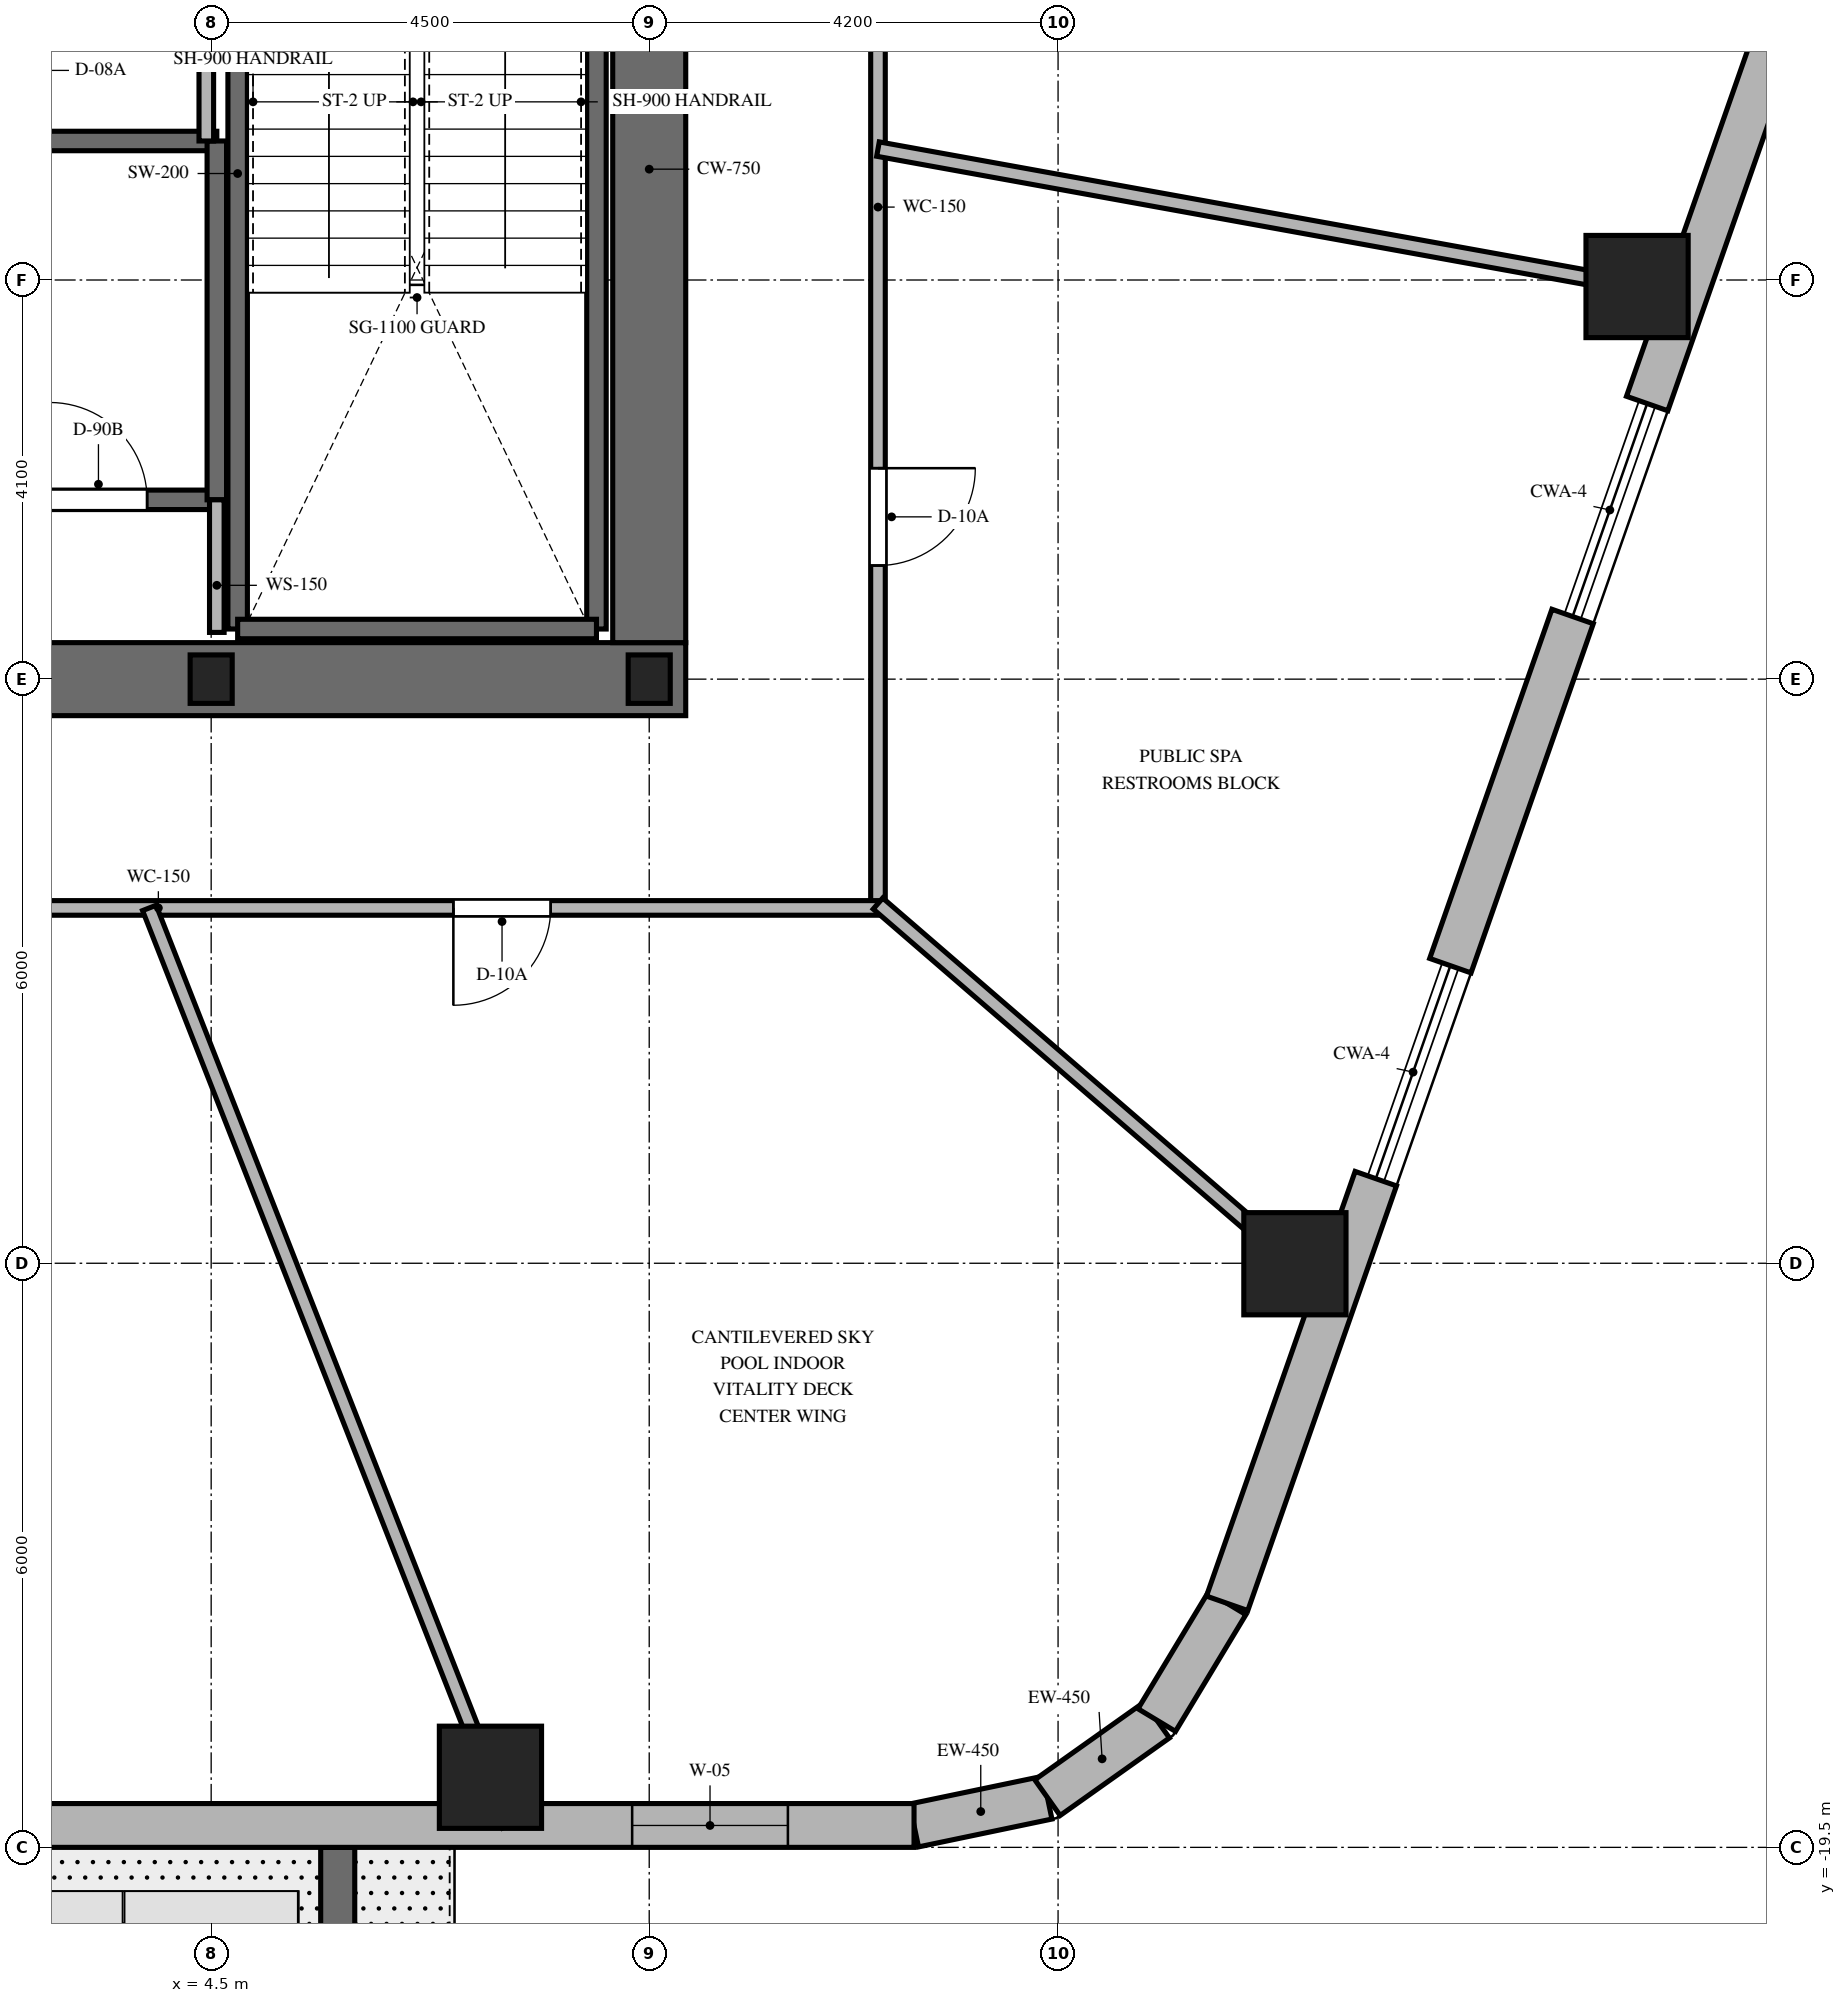
"""IFC4 building model, lengths in metres.
Left out: names, types, materials, properties, quantities, classifications, styles, units other than length and angle.
Written with IfcOpenShell. Run it as: python <this file> out.ifc"""

import sys

from ifc_helpers import new_model, si_unit, direction, frame, frame_2d, origin, origin_2d, place, context, subcontext, project, spatial, rectangle, i_section, extrude, element, fill, save


model = new_model("IFC4")
c1 = context("Model", 3, precision=1e-05, world=origin(), true_north=direction((0.0, 1.0)))
c2 = subcontext(c1, "Body", "Model", "MODEL_VIEW")
j1 = project(units=[si_unit("LENGTHUNIT", "METRE"), si_unit("PLANEANGLEUNIT", "RADIAN")], contexts=[c1])
p1 = place(None, origin())
s1 = spatial("IfcSite", under=j1, at=p1, CompositionType="ELEMENT")
p2 = place(p1, origin())
s2 = spatial("IfcBuilding", under=s1, at=p2, CompositionType="ELEMENT")
p3 = place(p2, frame((0.0, 0.0, 201.5)))
s3 = spatial("IfcBuildingStorey", under=s2, at=p3, CompositionType="ELEMENT", Elevation=201.5)
p4 = place(p3, frame((-9.375, -7.5, 0.0), z_axis=(0.0, 0.0, 1.0), x_axis=(1.0, 0.0, 0.0)))
e1 = element("IfcWall", 1, at=p4, inside=s3, PredefinedType="SHEAR", context=c2, shape_type="SweptSolid", body=[
    extrude(rectangle(XDim=18.75, YDim=0.75, at=frame_2d((9.375, 0.0))), origin(), (0.0, 0.0, 1.0), 5.0),
])
p5 = place(p4, frame((9.425, 0.0, 0.0)))
e2 = element("IfcOpeningElement", 2, at=p5, cuts=e1, PredefinedType="OPENING", context=c2, shape_type="SweptSolid", body=[
    extrude(rectangle(XDim=1.0, YDim=2.15, at=frame_2d((0.5, 1.075))), frame((0.0, 0.385, 0.0), z_axis=(0.0, -1.0, 0.0), x_axis=(1.0, 0.0, 0.0)), (0.0, 0.0, 1.0), 0.77),
])
p6 = place(p3, frame((9.0, -7.125, 0.0), z_axis=(0.0, 0.0, 1.0), x_axis=(0.0, 1.0, 0.0)))
e3 = element("IfcWall", 3, at=p6, inside=s3, PredefinedType="SHEAR", context=c2, shape_type="SweptSolid", body=[
    extrude(rectangle(XDim=14.25, YDim=0.75, at=frame_2d((7.125, 0.0))), origin(), (0.0, 0.0, 1.0), 5.0),
])
p7 = place(p6, frame((10.25, 0.0, 0.0)))
e4 = element("IfcOpeningElement", 4, at=p7, cuts=e3, PredefinedType="OPENING", context=c2, shape_type="SweptSolid", body=[
    extrude(rectangle(XDim=1.05, YDim=2.15, at=frame_2d((0.525, 1.075))), frame((0.0, 0.385, 0.0), z_axis=(0.0, -1.0, 0.0), x_axis=(1.0, 0.0, 0.0)), (0.0, 0.0, 1.0), 0.77),
])
for number, where, z_axis, x_axis in (
    (5, (4.772, -6.985, 0.0), (0.0, 0.0, 1.0), (0.0, 1.0, 0.0)),
    (6, (8.458, -6.985, 0.0), (0.0, 0.0, 1.0), (0.0, 1.0, 0.0)),
):
    element("IfcWall", number, at=place(p3, frame(where, z_axis=z_axis, x_axis=x_axis)), inside=s3, PredefinedType="SHEAR", context=c2, shape_type="SweptSolid", body=[
        extrude(rectangle(XDim=9.143, YDim=0.2, at=frame_2d((4.572, 0.0))), origin(), (0.0, 0.0, 1.0), 5.0),
    ])
p8 = place(p3, frame((4.772, -6.985, 0.0), z_axis=(0.0, 0.0, 1.0), x_axis=(1.0, 0.0, 0.0)))
e7 = element("IfcWall", 7, at=p8, inside=s3, PredefinedType="SHEAR", context=c2, shape_type="SweptSolid", body=[
    extrude(rectangle(XDim=3.686, YDim=0.2, at=frame_2d((1.843, 0.0))), origin(), (0.0, 0.0, 1.0), 5.0),
])
p9 = place(p3, frame((-4.608, -5.658, 0.0), z_axis=(0.0, 0.0, 1.0), x_axis=(1.0, 0.0, 0.0)))
e8 = element("IfcWall", 8, at=p9, inside=s3, PredefinedType="SHEAR", context=c2, shape_type="SweptSolid", body=[
    extrude(rectangle(XDim=9.166, YDim=0.2, at=frame_2d((4.583, 0.0))), origin(), (0.0, 0.0, 1.0), 5.0),
])
p10 = place(p9, frame((7.45, 0.0, 0.0)))
e9 = element("IfcOpeningElement", 9, at=p10, cuts=e8, PredefinedType="OPENING", context=c2, shape_type="SweptSolid", body=[
    extrude(rectangle(XDim=1.0, YDim=2.15, at=frame_2d((0.5, 1.075))), frame((0.0, 0.11, 0.0), z_axis=(0.0, -1.0, 0.0), x_axis=(1.0, 0.0, 0.0)), (0.0, 0.0, 1.0), 0.22),
])
p11 = place(p3, frame((-4.608, -1.972, 0.0), z_axis=(0.0, 0.0, 1.0), x_axis=(1.0, 0.0, 0.0)))
e10 = element("IfcWall", 10, at=p11, inside=s3, PredefinedType="SHEAR", context=c2, shape_type="SweptSolid", body=[
    extrude(rectangle(XDim=9.166, YDim=0.2, at=frame_2d((4.583, 0.0))), origin(), (0.0, 0.0, 1.0), 5.0),
])
p12 = place(p3, frame((4.558, -5.658, 0.0), z_axis=(0.0, 0.0, 1.0), x_axis=(0.0, 1.0, 0.0)))
e11 = element("IfcWall", 11, at=p12, inside=s3, PredefinedType="SHEAR", context=c2, shape_type="SweptSolid", body=[
    extrude(rectangle(XDim=3.686, YDim=0.2, at=frame_2d((1.843, 0.0))), origin(), (0.0, 0.0, 1.0), 5.0),
])
for number, where, z_axis, x_axis in (
    (12, (4.5, -7.5, 0.0), (0.0, 0.0, 1.0), (1.0, 0.0, 0.0)),
    (13, (9.0, -7.5, 0.0), (0.0, 0.0, 1.0), (1.0, 0.0, 0.0)),
):
    element("IfcColumn", number, at=place(p3, frame(where, z_axis=z_axis, x_axis=x_axis)), inside=s3, PredefinedType="COLUMN", context=c2, shape_type="SweptSolid", body=[
        extrude(i_section(OverallWidth=0.432, OverallDepth=0.498, WebThickness=0.056, FlangeThickness=0.089, at=origin_2d()), origin(), (0.0, 0.0, 1.0), 5.0),
    ])
for number, where, z_axis, x_axis in (
    (14, (7.369, -18.78, 0.0), (0.0, 0.0, 1.0), (1.0, 0.0, 0.0)),
    (15, (15.633, -13.505, 0.0), (0.0, 0.0, 1.0), (1.0, 0.0, 0.0)),
    (16, (19.148, -3.467, 0.0), (0.0, 0.0, 1.0), (1.0, 0.0, 0.0)),
):
    element("IfcColumn", number, at=place(p3, frame(where, z_axis=z_axis, x_axis=x_axis)), inside=s3, PredefinedType="COLUMN", context=c2, shape_type="SweptSolid", body=[
        extrude(rectangle(XDim=1.05, YDim=1.05, at=origin_2d()), origin(), (0.0, 0.0, 1.0), 5.0),
    ])
p13 = place(p3, frame((5.8, -21.93, 0.0), z_axis=(0.0, 0.0, 1.0), x_axis=(0.0, 1.0, 0.0)))
e17 = element("IfcWall", 17, at=p13, inside=s3, PredefinedType="SOLIDWALL", context=c2, shape_type="SweptSolid", body=[
    extrude(rectangle(XDim=2.43, YDim=0.35, at=frame_2d((1.215, 0.0))), origin(), (0.0, 0.0, 1.0), 1.42),
])
p14 = place(p3, frame((11.72, -19.275, 0.0), z_axis=(0.0, 0.0, 1.0), x_axis=(0.97893106758, 0.204191001093, 0.0)))
e18 = element("IfcWall", 18, at=p14, inside=s3, PredefinedType="SOLIDWALL", context=c2, shape_type="SweptSolid", body=[
    extrude(rectangle(XDim=1.4, YDim=0.45, at=frame_2d((0.7, 0.0))), origin(), (0.0, 0.0, 1.0), 4.7),
])
p15 = place(p3, frame((13.091, -18.989, 0.0), z_axis=(0.0, 0.0, 1.0), x_axis=(0.815574637848, 0.578651890258, 0.0)))
e19 = element("IfcWall", 19, at=p15, inside=s3, PredefinedType="SOLIDWALL", context=c2, shape_type="SweptSolid", body=[
    extrude(rectangle(XDim=1.377, YDim=0.45, at=frame_2d((0.688, 0.0))), origin(), (0.0, 0.0, 1.0), 4.7),
])
p16 = place(p3, frame((14.214, -18.192, 0.0), z_axis=(0.0, 0.0, 1.0), x_axis=(0.516340945502, 0.856383108193, 0.0)))
e20 = element("IfcWall", 20, at=p16, inside=s3, PredefinedType="SOLIDWALL", context=c2, shape_type="SweptSolid", body=[
    extrude(rectangle(XDim=1.4, YDim=0.45, at=frame_2d((0.7, 0.0))), origin(), (0.0, 0.0, 1.0), 4.7),
])
p17 = place(p3, frame((-10.108, -19.275, 0.0), z_axis=(0.0, 0.0, 1.0), x_axis=(1.0, 0.0, 0.0)))
e21 = element("IfcWall", 21, at=p17, inside=s3, PredefinedType="SOLIDWALL", context=c2, shape_type="SweptSolid", body=[
    extrude(rectangle(XDim=21.829, YDim=0.45, at=frame_2d((10.915, 0.0))), origin(), (0.0, 0.0, 1.0), 4.7),
])
p18 = place(p17, frame((5.503, 0.0, 0.0)))
e22 = element("IfcOpeningElement", 22, at=p18, cuts=e21, PredefinedType="OPENING", context=c2, shape_type="SweptSolid", body=[
    extrude(rectangle(XDim=1.0, YDim=2.15, at=frame_2d((0.5, 1.075))), frame((0.0, 0.235, 0.0), z_axis=(0.0, -1.0, 0.0), x_axis=(1.0, 0.0, 0.0)), (0.0, 0.0, 1.0), 0.47),
])
p19 = place(p17, frame((10.115, 0.0, 0.8)))
e23 = element("IfcOpeningElement", 23, at=p19, cuts=e21, PredefinedType="OPENING", context=c2, shape_type="SweptSolid", body=[
    extrude(rectangle(XDim=1.6, YDim=1.75, at=frame_2d((0.8, 0.875))), frame((0.0, 0.235, 0.0), z_axis=(0.0, -1.0, 0.0), x_axis=(1.0, 0.0, 0.0)), (0.0, 0.0, 1.0), 0.47),
])
p20 = place(p17, frame((18.933, 0.0, 0.8)))
e24 = element("IfcOpeningElement", 24, at=p20, cuts=e21, PredefinedType="OPENING", context=c2, shape_type="SweptSolid", body=[
    extrude(rectangle(XDim=1.6, YDim=1.75, at=frame_2d((0.8, 0.875))), frame((0.0, 0.235, 0.0), z_axis=(0.0, -1.0, 0.0), x_axis=(1.0, 0.0, 0.0)), (0.0, 0.0, 1.0), 0.47),
])
p21 = place(p3, frame((14.937, -16.993, 0.0), z_axis=(0.0, 0.0, 1.0), x_axis=(0.330437475159, 0.943827884209, 0.0)))
e25 = element("IfcWall", 25, at=p21, inside=s3, PredefinedType="SOLIDWALL", context=c2, shape_type="SweptSolid", body=[
    extrude(rectangle(XDim=4.622, YDim=0.45, at=frame_2d((2.311, 0.0))), origin(), (0.0, 0.0, 1.0), 4.7),
])
p22 = place(p3, frame((17.23, -10.443, 0.0), z_axis=(0.0, 0.0, 1.0), x_axis=(0.330436280441, 0.943828302483, 0.0)))
e26 = element("IfcWall", 26, at=p22, inside=s3, PredefinedType="SOLIDWALL", context=c2, shape_type="SweptSolid", body=[
    extrude(rectangle(XDim=3.8, YDim=0.45, at=frame_2d((1.9, 0.0))), origin(), (0.0, 0.0, 1.0), 4.7),
])
p23 = place(p3, frame((19.252, -4.669, 0.0), z_axis=(0.0, 0.0, 1.0), x_axis=(0.330411483424, 0.943836983606, 0.0)))
e27 = element("IfcWall", 27, at=p23, inside=s3, PredefinedType="SOLIDWALL", context=c2, shape_type="SweptSolid", body=[
    extrude(rectangle(XDim=4.631, YDim=0.45, at=frame_2d((2.315, 0.0))), origin(), (0.0, 0.0, 1.0), 4.7),
])
p24 = place(p3, frame((4.558, -7.02, 0.0), z_axis=(0.0, 0.0, 1.0), x_axis=(0.0, 1.0, 0.0)))
e28 = element("IfcWall", 28, at=p24, inside=s3, PredefinedType="PARTITIONING", context=c2, shape_type="SweptSolid", body=[
    extrude(rectangle(XDim=1.362, YDim=0.15, at=frame_2d((0.681, 0.0))), origin(), (0.0, 0.0, 1.0), 4.7),
])
p25 = place(p3, frame((4.45, -1.972, 0.0), z_axis=(0.0, 0.0, 1.0), x_axis=(0.0, 1.0, 0.0)))
e29 = element("IfcWall", 29, at=p25, inside=s3, PredefinedType="PARTITIONING", context=c2, shape_type="SweptSolid", body=[
    extrude(rectangle(XDim=4.222, YDim=0.15, at=frame_2d((2.111, 0.0))), origin(), (0.0, 0.0, 1.0), 4.7),
])
p26 = place(p3, frame((11.35, 9.85, 0.0), z_axis=(0.0, 0.0, 1.0), x_axis=(0.0, -1.0, 0.0)))
e30 = element("IfcWall", 30, at=p26, inside=s3, PredefinedType="PARTITIONING", context=c2, shape_type="SweptSolid", body=[
    extrude(rectangle(XDim=19.7, YDim=0.15, at=frame_2d((9.85, 0.0))), origin(), (0.0, 0.0, 1.0), 2.89),
])
p27 = place(p26, frame((2.989, 0.0, 0.0)))
e31 = element("IfcOpeningElement", 31, at=p27, cuts=e30, PredefinedType="OPENING", context=c2, shape_type="SweptSolid", body=[
    extrude(rectangle(XDim=1.0, YDim=2.03, at=frame_2d((0.5, 1.015))), frame((0.0, 0.085, 0.0), z_axis=(0.0, -1.0, 0.0), x_axis=(1.0, 0.0, 0.0)), (0.0, 0.0, 1.0), 0.17),
])
p28 = place(p26, frame((15.183, 0.0, 0.0)))
e32 = element("IfcOpeningElement", 32, at=p28, cuts=e30, PredefinedType="OPENING", context=c2, shape_type="SweptSolid", body=[
    extrude(rectangle(XDim=1.0, YDim=2.03, at=frame_2d((0.5, 1.015))), frame((0.0, 0.085, 0.0), z_axis=(0.0, -1.0, 0.0), x_axis=(1.0, 0.0, 0.0)), (0.0, 0.0, 1.0), 0.17),
])
p29 = place(p26, frame((8.819, 0.0, 0.0)))
e33 = element("IfcOpeningElement", 33, at=p29, cuts=e30, PredefinedType="OPENING", context=c2, shape_type="SweptSolid", body=[
    extrude(rectangle(XDim=1.0, YDim=2.03, at=frame_2d((0.5, 1.015))), frame((0.0, 0.085, 0.0), z_axis=(0.0, -1.0, 0.0), x_axis=(1.0, 0.0, 0.0)), (0.0, 0.0, 1.0), 0.17),
])
p30 = place(p3, frame((11.35, -9.85, 0.0), z_axis=(0.0, 0.0, 1.0), x_axis=(-1.0, 0.0, 0.0)))
e34 = element("IfcWall", 34, at=p30, inside=s3, PredefinedType="PARTITIONING", context=c2, shape_type="SweptSolid", body=[
    extrude(rectangle(XDim=22.7, YDim=0.15, at=frame_2d((11.35, 0.0))), origin(), (0.0, 0.0, 1.0), 2.89),
])
p31 = place(p30, frame((17.347, 0.0, 0.0)))
e35 = element("IfcOpeningElement", 35, at=p31, cuts=e34, PredefinedType="OPENING", context=c2, shape_type="SweptSolid", body=[
    extrude(rectangle(XDim=1.0, YDim=2.03, at=frame_2d((0.5, 1.015))), frame((0.0, 0.085, 0.0), z_axis=(0.0, -1.0, 0.0), x_axis=(1.0, 0.0, 0.0)), (0.0, 0.0, 1.0), 0.17),
])
p32 = place(p30, frame((10.423, 0.0, 0.0)))
e36 = element("IfcOpeningElement", 36, at=p32, cuts=e34, PredefinedType="OPENING", context=c2, shape_type="SweptSolid", body=[
    extrude(rectangle(XDim=1.0, YDim=2.03, at=frame_2d((0.5, 1.015))), frame((0.0, 0.085, 0.0), z_axis=(0.0, -1.0, 0.0), x_axis=(1.0, 0.0, 0.0)), (0.0, 0.0, 1.0), 0.17),
])
p33 = place(p30, frame((3.362, 0.0, 0.0)))
e37 = element("IfcOpeningElement", 37, at=p33, cuts=e34, PredefinedType="OPENING", context=c2, shape_type="SweptSolid", body=[
    extrude(rectangle(XDim=1.0, YDim=2.03, at=frame_2d((0.5, 1.015))), frame((0.0, 0.085, 0.0), z_axis=(0.0, -1.0, 0.0), x_axis=(1.0, 0.0, 0.0)), (0.0, 0.0, 1.0), 0.17),
])
p34 = place(p3, frame((3.865, -9.85, 0.0), z_axis=(0.0, 0.0, 1.0), x_axis=(0.365279308356, -0.930897968033, 0.0)))
e38 = element("IfcWall", 38, at=p34, inside=s3, PredefinedType="PARTITIONING", context=c2, shape_type="SweptSolid", body=[
    extrude(rectangle(XDim=10.125, YDim=0.15, at=frame_2d((5.062, 0.0))), origin(), (0.0, 0.0, 1.0), 2.89),
])
p35 = place(p3, frame((11.35, -9.805, 0.0), z_axis=(0.0, 0.0, 1.0), x_axis=(0.75671839422, -0.653740982232, 0.0)))
e39 = element("IfcWall", 39, at=p35, inside=s3, PredefinedType="PARTITIONING", context=c2, shape_type="SweptSolid", body=[
    extrude(rectangle(XDim=6.193, YDim=0.15, at=frame_2d((3.096, 0.0))), origin(), (0.0, 0.0, 1.0), 2.89),
])
p36 = place(p3, frame((11.35, -2.055, 0.0), z_axis=(0.0, 0.0, 1.0), x_axis=(0.983999921986, -0.178168890468, 0.0)))
e40 = element("IfcWall", 40, at=p36, inside=s3, PredefinedType="PARTITIONING", context=c2, shape_type="SweptSolid", body=[
    extrude(rectangle(XDim=8.426, YDim=0.15, at=frame_2d((4.213, 0.0))), origin(), (0.0, 0.0, 1.0), 2.89),
])
p37 = place(p20, origin())
e41 = element("IfcWindow", 41, at=p37, inside=s3, PartitioningType="SINGLE_PANEL", PredefinedType="WINDOW", context=c2, shape_type="SweptSolid", body=[
    extrude(rectangle(XDim=1.6, YDim=1.75, at=frame_2d((0.8, 0.875))), frame((0.0, 0.03, 0.0), z_axis=(0.0, -1.0, 0.0), x_axis=(1.0, 0.0, 0.0)), (0.0, 0.0, 1.0), 0.06),
])
fill(e24, e41)
p38 = place(p10, origin())
e42 = element("IfcDoor", 42, at=p38, inside=s3, OperationType="SINGLE_SWING_LEFT", PredefinedType="DOOR", context=c2, shape_type="SweptSolid", body=[
    extrude(rectangle(XDim=1.0, YDim=2.15, at=frame_2d((0.5, 1.075))), frame((0.0, 0.025, 0.0), z_axis=(0.0, -1.0, 0.0), x_axis=(1.0, 0.0, 0.0)), (0.0, 0.0, 1.0), 0.05),
])
fill(e9, e42)
p39 = place(p33, origin())
e43 = element("IfcDoor", 43, at=p39, inside=s3, OperationType="SINGLE_SWING_RIGHT", PredefinedType="DOOR", context=c2, shape_type="SweptSolid", body=[
    extrude(rectangle(XDim=1.0, YDim=2.03, at=frame_2d((0.5, 1.015))), frame((0.0, 0.025, 0.0), z_axis=(0.0, -1.0, 0.0), x_axis=(1.0, 0.0, 0.0)), (0.0, 0.0, 1.0), 0.05),
])
fill(e37, e43)
p40 = place(p28, origin())
e44 = element("IfcDoor", 44, at=p40, inside=s3, OperationType="SINGLE_SWING_LEFT", PredefinedType="DOOR", context=c2, shape_type="SweptSolid", body=[
    extrude(rectangle(XDim=1.0, YDim=2.03, at=frame_2d((0.5, 1.015))), frame((0.0, 0.025, 0.0), z_axis=(0.0, -1.0, 0.0), x_axis=(1.0, 0.0, 0.0)), (0.0, 0.0, 1.0), 0.05),
])
fill(e32, e44)
save(model, sys.argv[1])
